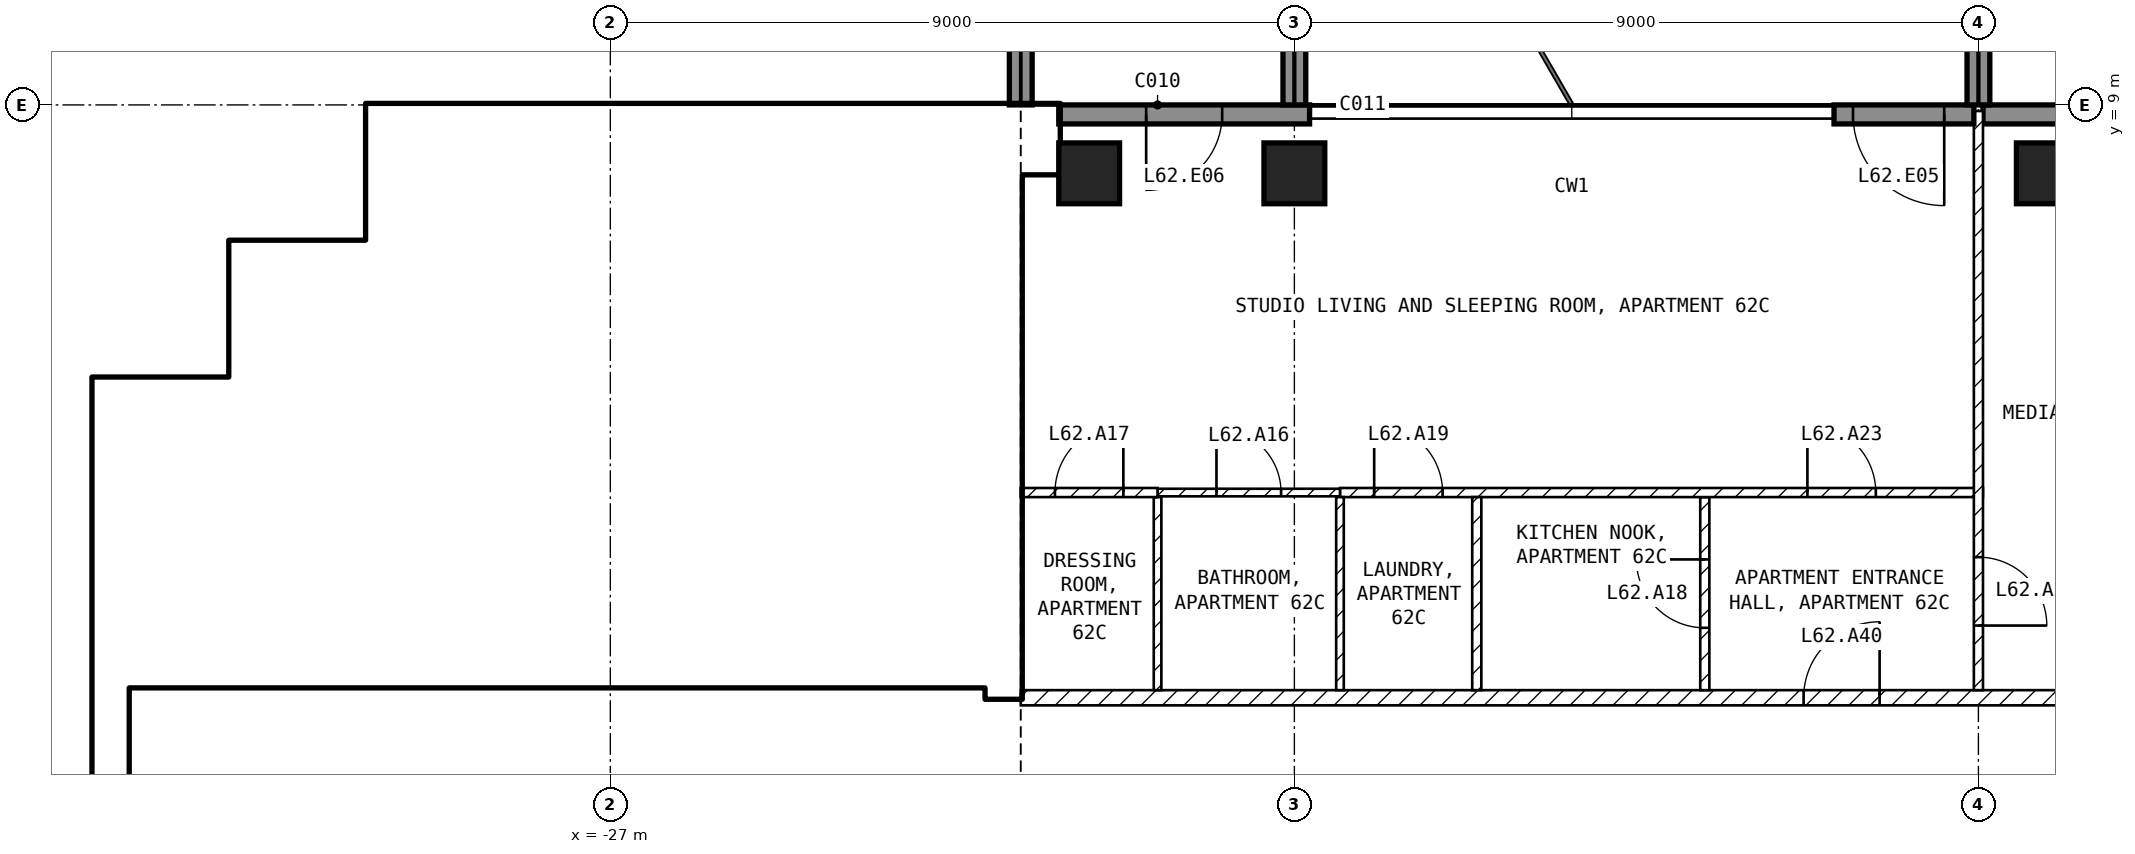
"""IFC4 building model, lengths in metres.
Left out: names, types, materials, properties, quantities, classifications, styles, units other than length and angle.
Written with IfcOpenShell. Run it as: python <this file> out.ifc"""

import sys

from ifc_helpers import new_model, si_unit, direction, frame, frame_2d, origin, origin_2d, place, context, subcontext, project, spatial, rectangle, extrude, element, fill, save


model = new_model("IFC4")
c1 = context("Model", 3, precision=1e-05, world=origin(), true_north=direction((0.0, 1.0)))
c2 = subcontext(c1, "Body", "Model", "MODEL_VIEW")
j1 = project(units=[si_unit("LENGTHUNIT", "METRE"), si_unit("PLANEANGLEUNIT", "RADIAN")], contexts=[c1])
p1 = place(None, origin())
s1 = spatial("IfcSite", under=j1, at=p1, CompositionType="ELEMENT")
p2 = place(p1, origin())
s2 = spatial("IfcBuilding", under=s1, at=p2, CompositionType="ELEMENT")
p3 = place(p2, frame((0.0, 0.0, 246.5)))
s3 = spatial("IfcBuildingStorey", under=s2, at=p3, CompositionType="ELEMENT", Elevation=246.5)
for number, where, z_axis, x_axis in (
    (1, (-20.7, 8.1, -0.25), (0.0, 0.0, 1.0), (1.0, 0.0, 0.0)),
    (2, (-18.0, 8.1, -0.25), (0.0, 0.0, 1.0), (1.0, 0.0, 0.0)),
    (3, (-8.1, 8.1, -0.25), (0.0, 0.0, 1.0), (1.0, 0.0, 0.0)),
):
    element("IfcColumn", number, at=place(p3, frame(where, z_axis=z_axis, x_axis=x_axis)), inside=s3, PredefinedType="COLUMN", context=c2, shape_type="SweptSolid", body=[
        extrude(rectangle(XDim=0.8, YDim=0.8, at=origin_2d()), origin(), (0.0, 0.0, 1.0), 3.5),
    ])
p4 = place(p3, frame((-5.9, 8.875, 0.0), z_axis=(0.0, 0.0, 1.0), x_axis=(-1.0, 0.0, 0.0)))
e4 = element("IfcWall", 4, at=p4, inside=s3, PredefinedType="SOLIDWALL", context=c2, shape_type="SweptSolid", body=[
    extrude(rectangle(XDim=3.04, YDim=0.25, at=frame_2d((1.52, 0.0))), origin(), (0.0, 0.0, 1.0), 3.25),
])
p5 = place(p4, frame((0.25, 0.0, 0.0)))
e5 = element("IfcOpeningElement", 5, at=p5, cuts=e4, PredefinedType="OPENING", context=c2, shape_type="SweptSolid", body=[
    extrude(rectangle(XDim=1.2, YDim=2.4, at=frame_2d((0.6, 1.2))), frame((0.0, 0.135, 0.0), z_axis=(0.0, -1.0, 0.0), x_axis=(1.0, 0.0, 0.0)), (0.0, 0.0, 1.0), 0.27),
])
p6 = place(p3, frame((-9.06, 8.875, 0.0), z_axis=(0.0, 0.0, 1.0), x_axis=(-1.0, 0.0, 0.0)))
e6 = element("IfcWall", 6, at=p6, inside=s3, PredefinedType="SOLIDWALL", context=c2, shape_type="SweptSolid", body=[
    extrude(rectangle(XDim=1.84, YDim=0.25, at=frame_2d((0.92, 0.0))), origin(), (0.0, 0.0, 1.0), 3.25),
])
p7 = place(p6, frame((0.39, 0.0, 0.0)))
e7 = element("IfcOpeningElement", 7, at=p7, cuts=e6, PredefinedType="OPENING", context=c2, shape_type="SweptSolid", body=[
    extrude(rectangle(XDim=1.2, YDim=2.4, at=frame_2d((0.6, 1.2))), frame((0.0, 0.135, 0.0), z_axis=(0.0, -1.0, 0.0), x_axis=(1.0, 0.0, 0.0)), (0.0, 0.0, 1.0), 0.27),
])
p8 = place(p3, frame((-17.8, 8.875, 0.0), z_axis=(0.0, 0.0, 1.0), x_axis=(-1.0, 0.0, 0.0)))
e8 = element("IfcWall", 8, at=p8, inside=s3, PredefinedType="SOLIDWALL", context=c2, shape_type="SweptSolid", body=[
    extrude(rectangle(XDim=3.3, YDim=0.25, at=frame_2d((1.65, 0.0))), origin(), (0.0, 0.0, 1.0), 3.25),
])
p9 = place(p8, frame((1.15, 0.0, 0.0)))
e9 = element("IfcOpeningElement", 9, at=p9, cuts=e8, PredefinedType="OPENING", context=c2, shape_type="SweptSolid", body=[
    extrude(rectangle(XDim=1.0, YDim=2.4, at=frame_2d((0.5, 1.2))), frame((0.0, 0.135, 0.0), z_axis=(0.0, -1.0, 0.0), x_axis=(1.0, 0.0, 0.0)), (0.0, 0.0, 1.0), 0.27),
])
for number, where, z_axis, x_axis in (
    (10, (-21.6, 9.0, 0.0), (0.0, 0.0, 1.0), (0.0, 1.0, 0.0)),
    (11, (-18.0, 9.0, 0.0), (0.0, 0.0, 1.0), (0.0, 1.0, 0.0)),
    (12, (-9.0, 9.0, 0.0), (0.0, 0.0, 1.0), (0.0, 1.0, 0.0)),
):
    element("IfcWall", number, at=place(p3, frame(where, z_axis=z_axis, x_axis=x_axis)), inside=s3, PredefinedType="SOLIDWALL", context=c2, shape_type="SweptSolid", body=[
        extrude(rectangle(XDim=2.7, YDim=0.3, at=frame_2d((1.35, 0.0))), origin(), (0.0, 0.0, 1.0), 3.25),
    ])
p10 = place(p3, frame((-33.575, -4.95, 0.0), z_axis=(0.0, 0.0, 1.0), x_axis=(0.0, 1.0, 0.0)))
e13 = element("IfcWall", 13, at=p10, inside=s3, PredefinedType="SHEAR", context=c2, shape_type="SweptSolid", body=[
    extrude(rectangle(XDim=10.35, YDim=0.45, at=frame_2d((5.175, 0.0))), origin(), (0.0, 0.0, 1.0), 3.25),
])
for number, where, z_axis, x_axis in (
    (14, (-33.35, 5.175, 0.0), (0.0, 0.0, 1.0), (1.0, 0.0, 0.0)),
    (15, (-31.775, 5.4, 0.0), (0.0, 0.0, 1.0), (0.0, 1.0, 0.0)),
    (16, (-31.55, 6.975, 0.0), (0.0, 0.0, 1.0), (1.0, 0.0, 0.0)),
    (17, (-29.975, 7.2, 0.0), (0.0, 0.0, 1.0), (0.0, 1.0, 0.0)),
):
    element("IfcWall", number, at=place(p3, frame(where, z_axis=z_axis, x_axis=x_axis)), inside=s3, PredefinedType="SHEAR", context=c2, shape_type="SweptSolid", body=[
        extrude(rectangle(XDim=1.8, YDim=0.45, at=frame_2d((0.9, 0.0))), origin(), (0.0, 0.0, 1.0), 3.25),
    ])
p11 = place(p3, frame((-29.75, 8.55, 0.0), z_axis=(0.0, 0.0, 1.0), x_axis=(1.0, 0.0, 0.0)))
e18 = element("IfcWall", 18, at=p11, inside=s3, PredefinedType="SHEAR", context=c2, shape_type="SweptSolid", body=[
    extrude(rectangle(XDim=8.65, YDim=0.9, at=frame_2d((4.325, 0.0))), origin(), (0.0, 0.0, 1.0), 3.25),
])
p12 = place(p3, frame((-21.825, 1.2, 0.0), z_axis=(0.0, 0.0, 1.0), x_axis=(0.0, 1.0, 0.0)))
e19 = element("IfcWall", 19, at=p12, inside=s3, PredefinedType="SHEAR", context=c2, shape_type="SweptSolid", body=[
    extrude(rectangle(XDim=6.9, YDim=0.45, at=frame_2d((3.45, 0.0))), origin(), (0.0, 0.0, 1.0), 3.25),
])
p13 = place(p3, frame((-33.35, 1.45, 0.0), z_axis=(0.0, 0.0, 1.0), x_axis=(1.0, 0.0, 0.0)))
e20 = element("IfcWall", 20, at=p13, inside=s3, PredefinedType="SOLIDWALL", context=c2, shape_type="SweptSolid", body=[
    extrude(rectangle(XDim=11.3, YDim=0.2, at=frame_2d((5.65, 0.0))), origin(), (0.0, 0.0, 1.0), 3.25),
])
p14 = place(p13, frame((9.55, 0.0, 0.0)))
e21 = element("IfcOpeningElement", 21, at=p14, cuts=e20, PredefinedType="OPENING", context=c2, shape_type="SweptSolid", body=[
    extrude(rectangle(XDim=1.0, YDim=2.1, at=frame_2d((0.5, 1.05))), frame((0.0, 0.11, 0.0), z_axis=(0.0, -1.0, 0.0), x_axis=(1.0, 0.0, 0.0)), (0.0, 0.0, 1.0), 0.22),
])
p15 = place(p13, frame((7.05, 0.0, 0.0)))
e22 = element("IfcOpeningElement", 22, at=p15, cuts=e20, PredefinedType="OPENING", context=c2, shape_type="SweptSolid", body=[
    extrude(rectangle(XDim=1.0, YDim=2.1, at=frame_2d((0.5, 1.05))), frame((0.0, 0.11, 0.0), z_axis=(0.0, -1.0, 0.0), x_axis=(1.0, 0.0, 0.0)), (0.0, 0.0, 1.0), 0.22),
])
p16 = place(p13, frame((1.175, 0.0, 0.0)))
e23 = element("IfcOpeningElement", 23, at=p16, cuts=e20, PredefinedType="OPENING", context=c2, shape_type="SweptSolid", body=[
    extrude(rectangle(XDim=0.9, YDim=2.1, at=frame_2d((0.45, 1.05))), frame((0.0, 0.11, 0.0), z_axis=(0.0, -1.0, 0.0), x_axis=(1.0, 0.0, 0.0)), (0.0, 0.0, 1.0), 0.22),
])
p17 = place(p3, frame((-28.35, 5.15, 0.0), z_axis=(0.0, 0.0, 1.0), x_axis=(1.0, 0.0, 0.0)))
e24 = element("IfcWall", 24, at=p17, inside=s3, PredefinedType="SOLIDWALL", context=c2, shape_type="SweptSolid", body=[
    extrude(rectangle(XDim=6.3, YDim=0.2, at=frame_2d((3.15, 0.0))), origin(), (0.0, 0.0, 1.0), 3.25),
])
p18 = place(p17, frame((5.1, 0.0, 0.0)))
e25 = element("IfcOpeningElement", 25, at=p18, cuts=e24, PredefinedType="OPENING", context=c2, shape_type="SweptSolid", body=[
    extrude(rectangle(XDim=1.0, YDim=2.1, at=frame_2d((0.5, 1.05))), frame((0.0, 0.11, 0.0), z_axis=(0.0, -1.0, 0.0), x_axis=(1.0, 0.0, 0.0)), (0.0, 0.0, 1.0), 0.22),
])
p19 = place(p3, frame((-28.25, 5.25, 0.0), z_axis=(0.0, 0.0, 1.0), x_axis=(0.0, 1.0, 0.0)))
e26 = element("IfcWall", 26, at=p19, inside=s3, PredefinedType="SOLIDWALL", context=c2, shape_type="SweptSolid", body=[
    extrude(rectangle(XDim=2.85, YDim=0.2, at=frame_2d((1.425, 0.0))), origin(), (0.0, 0.0, 1.0), 3.25),
])
p20 = place(p3, frame((-33.35, 3.95, 0.0), z_axis=(0.0, 0.0, 1.0), x_axis=(1.0, 0.0, 0.0)))
e27 = element("IfcWall", 27, at=p20, inside=s3, PredefinedType="SOLIDWALL", context=c2, shape_type="SweptSolid", body=[
    extrude(rectangle(XDim=6.15, YDim=0.2, at=frame_2d((3.075, 0.0))), origin(), (0.0, 0.0, 1.0), 3.25),
])
p21 = place(p3, frame((-27.1, 1.55, 0.0), z_axis=(0.0, 0.0, 1.0), x_axis=(0.0, 1.0, 0.0)))
e28 = element("IfcWall", 28, at=p21, inside=s3, PredefinedType="SOLIDWALL", context=c2, shape_type="SweptSolid", body=[
    extrude(rectangle(XDim=3.5, YDim=0.2, at=frame_2d((1.75, 0.0))), origin(), (0.0, 0.0, 1.0), 3.25),
])
p22 = place(p21, frame((0.6, 0.0, 0.0)))
e29 = element("IfcOpeningElement", 29, at=p22, cuts=e28, PredefinedType="OPENING", context=c2, shape_type="SweptSolid", body=[
    extrude(rectangle(XDim=1.1, YDim=2.1, at=frame_2d((0.55, 1.05))), frame((0.0, 0.11, 0.0), z_axis=(0.0, -1.0, 0.0), x_axis=(1.0, 0.0, 0.0)), (0.0, 0.0, 1.0), 0.22),
])
p23 = place(p21, frame((2.6, 0.0, 0.0)))
e30 = element("IfcOpeningElement", 30, at=p23, cuts=e28, PredefinedType="OPENING", context=c2, shape_type="SweptSolid", body=[
    extrude(rectangle(XDim=0.8, YDim=2.1, at=frame_2d((0.4, 1.05))), frame((0.0, 0.11, 0.0), z_axis=(0.0, -1.0, 0.0), x_axis=(1.0, 0.0, 0.0)), (0.0, 0.0, 1.0), 0.22),
])
p24 = place(p3, frame((-30.0, 1.55, 0.0), z_axis=(0.0, 0.0, 1.0), x_axis=(0.0, 1.0, 0.0)))
e31 = element("IfcWall", 31, at=p24, inside=s3, PredefinedType="SOLIDWALL", context=c2, shape_type="SweptSolid", body=[
    extrude(rectangle(XDim=2.3, YDim=0.2, at=frame_2d((1.15, 0.0))), origin(), (0.0, 0.0, 1.0), 3.25),
])
p25 = place(p3, frame((-21.6, 1.2, 0.0), z_axis=(0.0, 0.0, 1.0), x_axis=(1.0, 0.0, 0.0)))
e32 = element("IfcWall", 32, at=p25, inside=s3, PredefinedType="PARTITIONING", context=c2, shape_type="SweptSolid", body=[
    extrude(rectangle(XDim=17.2, YDim=0.2, at=frame_2d((8.6, 0.0))), origin(), (0.0, 0.0, 1.0), 3.25),
])
p26 = place(p25, frame((10.3, 0.0, 0.0)))
e33 = element("IfcOpeningElement", 33, at=p26, cuts=e32, PredefinedType="OPENING", context=c2, shape_type="SweptSolid", body=[
    extrude(rectangle(XDim=1.0, YDim=2.1, at=frame_2d((0.5, 1.05))), frame((0.0, 0.11, 0.0), z_axis=(0.0, -1.0, 0.0), x_axis=(1.0, 0.0, 0.0)), (0.0, 0.0, 1.0), 0.22),
])
p27 = place(p3, frame((-12.6, 1.3, 0.0), z_axis=(0.0, 0.0, 1.0), x_axis=(0.0, 1.0, 0.0)))
e34 = element("IfcWall", 34, at=p27, inside=s3, PredefinedType="PARTITIONING", context=c2, shape_type="SweptSolid", body=[
    extrude(rectangle(XDim=2.54, YDim=0.12, at=frame_2d((1.27, 0.0))), origin(), (0.0, 0.0, 1.0), 3.25),
])
p28 = place(p27, frame((0.82, 0.0, 0.0)))
e35 = element("IfcOpeningElement", 35, at=p28, cuts=e34, PredefinedType="OPENING", context=c2, shape_type="SweptSolid", body=[
    extrude(rectangle(XDim=0.9, YDim=2.1, at=frame_2d((0.45, 1.05))), frame((0.0, 0.07, 0.0), z_axis=(0.0, -1.0, 0.0), x_axis=(1.0, 0.0, 0.0)), (0.0, 0.0, 1.0), 0.14),
])
p29 = place(p3, frame((-17.4, 3.9, 0.0), z_axis=(0.0, 0.0, 1.0), x_axis=(1.0, 0.0, 0.0)))
e36 = element("IfcWall", 36, at=p29, inside=s3, PredefinedType="PARTITIONING", context=c2, shape_type="SweptSolid", body=[
    extrude(rectangle(XDim=8.46, YDim=0.12, at=frame_2d((4.23, 0.0))), origin(), (0.0, 0.0, 1.0), 3.25),
])
p30 = place(p29, frame((0.45, 0.0, 0.0)))
e37 = element("IfcOpeningElement", 37, at=p30, cuts=e36, PredefinedType="OPENING", context=c2, shape_type="SweptSolid", body=[
    extrude(rectangle(XDim=0.9, YDim=2.1, at=frame_2d((0.45, 1.05))), frame((0.0, 0.07, 0.0), z_axis=(0.0, -1.0, 0.0), x_axis=(1.0, 0.0, 0.0)), (0.0, 0.0, 1.0), 0.14),
])
p31 = place(p29, frame((6.15, 0.0, 0.0)))
e38 = element("IfcOpeningElement", 38, at=p31, cuts=e36, PredefinedType="OPENING", context=c2, shape_type="SweptSolid", body=[
    extrude(rectangle(XDim=0.9, YDim=2.1, at=frame_2d((0.45, 1.05))), frame((0.0, 0.07, 0.0), z_axis=(0.0, -1.0, 0.0), x_axis=(1.0, 0.0, 0.0)), (0.0, 0.0, 1.0), 0.14),
])
p32 = place(p3, frame((-9.0, 8.92, 0.0), z_axis=(0.0, 0.0, 1.0), x_axis=(0.0, -1.0, 0.0)))
e39 = element("IfcWall", 39, at=p32, inside=s3, PredefinedType="PARTITIONING", context=c2, shape_type="SweptSolid", body=[
    extrude(rectangle(XDim=7.62, YDim=0.12, at=frame_2d((3.81, 0.0))), origin(), (0.0, 0.0, 1.0), 3.25),
])
p33 = place(p32, frame((5.87, 0.0, 0.0)))
e40 = element("IfcOpeningElement", 40, at=p33, cuts=e39, PredefinedType="OPENING", context=c2, shape_type="SweptSolid", body=[
    extrude(rectangle(XDim=0.9, YDim=2.1, at=frame_2d((0.45, 1.05))), frame((0.0, 0.07, 0.0), z_axis=(0.0, -1.0, 0.0), x_axis=(1.0, 0.0, 0.0)), (0.0, 0.0, 1.0), 0.14),
])
p34 = place(p3, frame((-15.6, 1.3, 0.0), z_axis=(0.0, 0.0, 1.0), x_axis=(0.0, 1.0, 0.0)))
e41 = element("IfcWall", 41, at=p34, inside=s3, PredefinedType="PARTITIONING", context=c2, shape_type="SweptSolid", body=[
    extrude(rectangle(XDim=2.54, YDim=0.12, at=frame_2d((1.27, 0.0))), origin(), (0.0, 0.0, 1.0), 3.25),
])
for number, where, z_axis, x_axis in (
    (42, (-17.4, 1.3, 0.0), (0.0, 0.0, 1.0), (0.0, 1.0, 0.0)),
    (43, (-19.8, 1.3, 0.0), (0.0, 0.0, 1.0), (0.0, 1.0, 0.0)),
):
    element("IfcWall", number, at=place(p3, frame(where, z_axis=z_axis, x_axis=x_axis)), inside=s3, PredefinedType="PARTITIONING", context=c2, shape_type="SweptSolid", body=[
        extrude(rectangle(XDim=2.54, YDim=0.1, at=frame_2d((1.27, 0.0))), origin(), (0.0, 0.0, 1.0), 3.25),
    ])
p35 = place(p3, frame((-19.8, 3.9, 0.0), z_axis=(0.0, 0.0, 1.0), x_axis=(1.0, 0.0, 0.0)))
e44 = element("IfcWall", 44, at=p35, inside=s3, PredefinedType="PARTITIONING", context=c2, shape_type="SweptSolid", body=[
    extrude(rectangle(XDim=2.4, YDim=0.1, at=frame_2d((1.2, 0.0))), origin(), (0.0, 0.0, 1.0), 3.25),
])
p36 = place(p35, frame((0.775, 0.0, 0.0)))
e45 = element("IfcOpeningElement", 45, at=p36, cuts=e44, PredefinedType="OPENING", context=c2, shape_type="SweptSolid", body=[
    extrude(rectangle(XDim=0.85, YDim=2.1, at=frame_2d((0.425, 1.05))), frame((0.0, 0.06, 0.0), z_axis=(0.0, -1.0, 0.0), x_axis=(1.0, 0.0, 0.0)), (0.0, 0.0, 1.0), 0.12),
])
p37 = place(p3, frame((-21.6, 3.9, 0.0), z_axis=(0.0, 0.0, 1.0), x_axis=(1.0, 0.0, 0.0)))
e46 = element("IfcWall", 46, at=p37, inside=s3, PredefinedType="PARTITIONING", context=c2, shape_type="SweptSolid", body=[
    extrude(rectangle(XDim=1.8, YDim=0.12, at=frame_2d((0.9, 0.0))), origin(), (0.0, 0.0, 1.0), 3.25),
])
p38 = place(p37, frame((0.45, 0.0, 0.0)))
e47 = element("IfcOpeningElement", 47, at=p38, cuts=e46, PredefinedType="OPENING", context=c2, shape_type="SweptSolid", body=[
    extrude(rectangle(XDim=0.9, YDim=2.1, at=frame_2d((0.45, 1.05))), frame((0.0, 0.07, 0.0), z_axis=(0.0, -1.0, 0.0), x_axis=(1.0, 0.0, 0.0)), (0.0, 0.0, 1.0), 0.14),
])
p39 = place(p7, origin())
e48 = element("IfcDoor", 48, at=p39, inside=s3, OperationType="SINGLE_SWING_LEFT", PredefinedType="DOOR", context=c2, shape_type="SweptSolid", body=[
    extrude(rectangle(XDim=1.2, YDim=2.4, at=frame_2d((0.6, 1.2))), frame((0.0, 0.025, 0.0), z_axis=(0.0, -1.0, 0.0), x_axis=(1.0, 0.0, 0.0)), (0.0, 0.0, 1.0), 0.05),
])
fill(e7, e48)
p40 = place(p9, origin())
e49 = element("IfcDoor", 49, at=p40, inside=s3, OperationType="SINGLE_SWING_RIGHT", PredefinedType="DOOR", context=c2, shape_type="SweptSolid", body=[
    extrude(rectangle(XDim=1.0, YDim=2.4, at=frame_2d((0.5, 1.2))), frame((0.0, 0.025, 0.0), z_axis=(0.0, -1.0, 0.0), x_axis=(1.0, 0.0, 0.0)), (0.0, 0.0, 1.0), 0.05),
])
fill(e9, e49)
p41 = place(p22, origin())
e50 = element("IfcDoor", 50, at=p41, inside=s3, OperationType="DOUBLE_DOOR_SLIDING", PredefinedType="DOOR", context=c2, shape_type="SweptSolid", body=[
    extrude(rectangle(XDim=1.1, YDim=2.1, at=frame_2d((0.55, 1.05))), frame((0.0, 0.025, 0.0), z_axis=(0.0, -1.0, 0.0), x_axis=(1.0, 0.0, 0.0)), (0.0, 0.0, 1.0), 0.05),
])
fill(e29, e50)
p42 = place(p18, origin())
e51 = element("IfcDoor", 51, at=p42, inside=s3, OperationType="SINGLE_SWING_LEFT", PredefinedType="DOOR", context=c2, shape_type="SweptSolid", body=[
    extrude(rectangle(XDim=1.0, YDim=2.1, at=frame_2d((0.5, 1.05))), frame((0.0, 0.025, 0.0), z_axis=(0.0, -1.0, 0.0), x_axis=(1.0, 0.0, 0.0)), (0.0, 0.0, 1.0), 0.05),
])
fill(e25, e51)
p43 = place(p14, origin())
e52 = element("IfcDoor", 52, at=p43, inside=s3, OperationType="SINGLE_SWING_LEFT", PredefinedType="DOOR", context=c2, shape_type="SweptSolid", body=[
    extrude(rectangle(XDim=1.0, YDim=2.1, at=frame_2d((0.5, 1.05))), frame((0.0, 0.025, 0.0), z_axis=(0.0, -1.0, 0.0), x_axis=(1.0, 0.0, 0.0)), (0.0, 0.0, 1.0), 0.05),
])
fill(e21, e52)
p44 = place(p15, origin())
e53 = element("IfcDoor", 53, at=p44, inside=s3, OperationType="SINGLE_SWING_LEFT", PredefinedType="DOOR", context=c2, shape_type="SweptSolid", body=[
    extrude(rectangle(XDim=1.0, YDim=2.1, at=frame_2d((0.5, 1.05))), frame((0.0, 0.025, 0.0), z_axis=(0.0, -1.0, 0.0), x_axis=(1.0, 0.0, 0.0)), (0.0, 0.0, 1.0), 0.05),
])
fill(e22, e53)
p45 = place(p23, origin())
e54 = element("IfcDoor", 54, at=p45, inside=s3, OperationType="SINGLE_SWING_LEFT", PredefinedType="DOOR", context=c2, shape_type="SweptSolid", body=[
    extrude(rectangle(XDim=0.8, YDim=2.1, at=frame_2d((0.4, 1.05))), frame((0.0, 0.025, 0.0), z_axis=(0.0, -1.0, 0.0), x_axis=(1.0, 0.0, 0.0)), (0.0, 0.0, 1.0), 0.05),
])
fill(e30, e54)
p46 = place(p16, origin())
e55 = element("IfcDoor", 55, at=p46, inside=s3, OperationType="SINGLE_SWING_LEFT", PredefinedType="DOOR", context=c2, shape_type="SweptSolid", body=[
    extrude(rectangle(XDim=0.9, YDim=2.1, at=frame_2d((0.45, 1.05))), frame((0.0, 0.025, 0.0), z_axis=(0.0, -1.0, 0.0), x_axis=(1.0, 0.0, 0.0)), (0.0, 0.0, 1.0), 0.05),
])
fill(e23, e55)
p47 = place(p36, origin())
e56 = element("IfcDoor", 56, at=p47, inside=s3, OperationType="SINGLE_SWING_LEFT", PredefinedType="DOOR", context=c2, shape_type="SweptSolid", body=[
    extrude(rectangle(XDim=0.85, YDim=2.1, at=frame_2d((0.425, 1.05))), frame((0.0, 0.025, 0.0), z_axis=(0.0, -1.0, 0.0), x_axis=(1.0, 0.0, 0.0)), (0.0, 0.0, 1.0), 0.05),
])
fill(e45, e56)
p48 = place(p38, origin())
e57 = element("IfcDoor", 57, at=p48, inside=s3, OperationType="SINGLE_SWING_RIGHT", PredefinedType="DOOR", context=c2, shape_type="SweptSolid", body=[
    extrude(rectangle(XDim=0.9, YDim=2.1, at=frame_2d((0.45, 1.05))), frame((0.0, 0.025, 0.0), z_axis=(0.0, -1.0, 0.0), x_axis=(1.0, 0.0, 0.0)), (0.0, 0.0, 1.0), 0.05),
])
fill(e47, e57)
p49 = place(p28, origin())
e58 = element("IfcDoor", 58, at=p49, inside=s3, OperationType="SINGLE_SWING_RIGHT", PredefinedType="DOOR", context=c2, shape_type="SweptSolid", body=[
    extrude(rectangle(XDim=0.9, YDim=2.1, at=frame_2d((0.45, 1.05))), frame((0.0, 0.025, 0.0), z_axis=(0.0, -1.0, 0.0), x_axis=(1.0, 0.0, 0.0)), (0.0, 0.0, 1.0), 0.05),
])
fill(e35, e58)
p50 = place(p30, origin())
e59 = element("IfcDoor", 59, at=p50, inside=s3, OperationType="SINGLE_SWING_LEFT", PredefinedType="DOOR", context=c2, shape_type="SweptSolid", body=[
    extrude(rectangle(XDim=0.9, YDim=2.1, at=frame_2d((0.45, 1.05))), frame((0.0, 0.025, 0.0), z_axis=(0.0, -1.0, 0.0), x_axis=(1.0, 0.0, 0.0)), (0.0, 0.0, 1.0), 0.05),
])
fill(e37, e59)
p51 = place(p33, origin())
e60 = element("IfcDoor", 60, at=p51, inside=s3, OperationType="SINGLE_SWING_RIGHT", PredefinedType="DOOR", context=c2, shape_type="SweptSolid", body=[
    extrude(rectangle(XDim=0.9, YDim=2.1, at=frame_2d((0.45, 1.05))), frame((0.0, 0.025, 0.0), z_axis=(0.0, -1.0, 0.0), x_axis=(1.0, 0.0, 0.0)), (0.0, 0.0, 1.0), 0.05),
])
fill(e40, e60)
p52 = place(p31, origin())
e61 = element("IfcDoor", 61, at=p52, inside=s3, OperationType="SINGLE_SWING_LEFT", PredefinedType="DOOR", context=c2, shape_type="SweptSolid", body=[
    extrude(rectangle(XDim=0.9, YDim=2.1, at=frame_2d((0.45, 1.05))), frame((0.0, 0.025, 0.0), z_axis=(0.0, -1.0, 0.0), x_axis=(1.0, 0.0, 0.0)), (0.0, 0.0, 1.0), 0.05),
])
fill(e38, e61)
p53 = place(p26, origin())
e62 = element("IfcDoor", 62, at=p53, inside=s3, OperationType="SINGLE_SWING_RIGHT", PredefinedType="DOOR", context=c2, shape_type="SweptSolid", body=[
    extrude(rectangle(XDim=1.0, YDim=2.1, at=frame_2d((0.5, 1.05))), frame((0.0, 0.025, 0.0), z_axis=(0.0, -1.0, 0.0), x_axis=(1.0, 0.0, 0.0)), (0.0, 0.0, 1.0), 0.05),
])
fill(e33, e62)
save(model, sys.argv[1])
